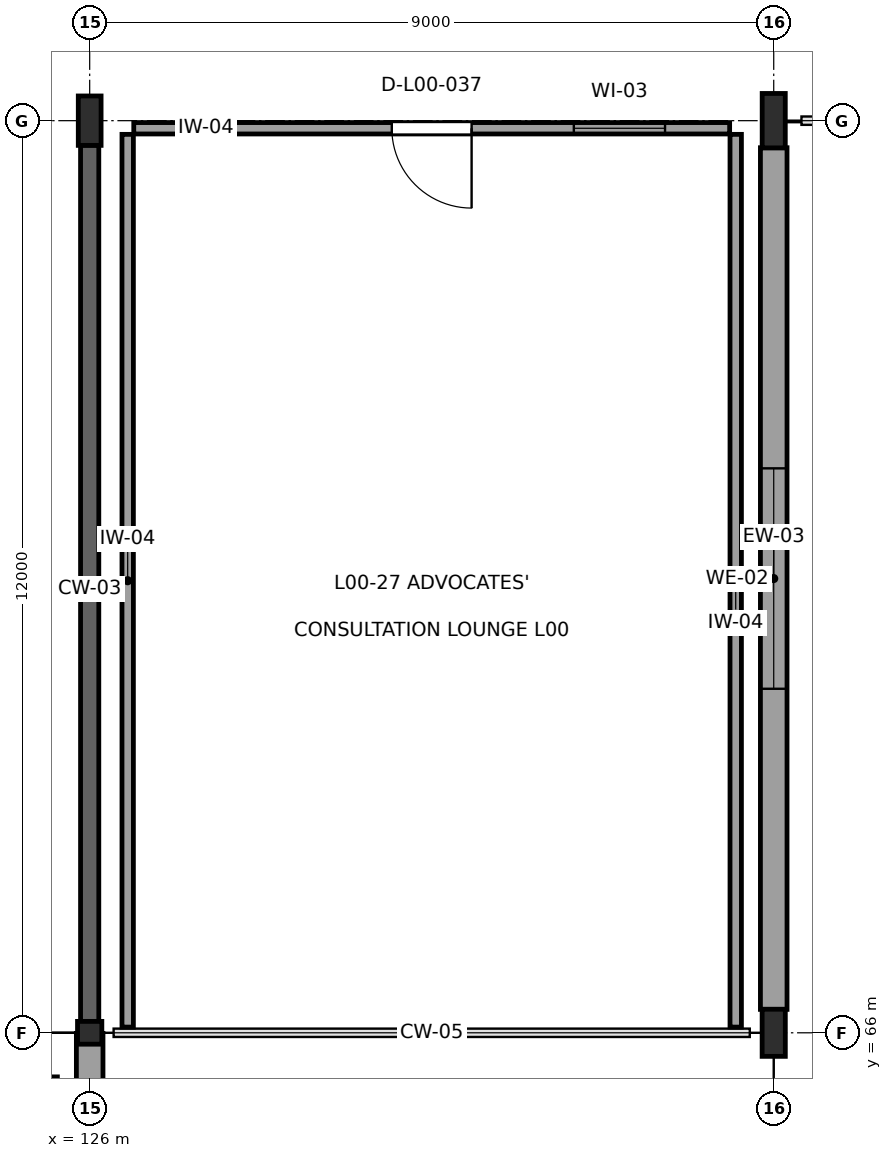
"""IFC4 building model, lengths in metres.
Left out: names, types, materials, properties, quantities, classifications, styles, units other than length and angle.
Written with IfcOpenShell. Run it as: python <this file> out.ifc"""

import sys

from ifc_helpers import new_model, si_unit, direction, frame, frame_2d, origin, origin_2d, place, context, subcontext, project, spatial, rectangle, i_section, extrude, element, fill, save


model = new_model("IFC4")
c1 = context("Model", 3, precision=1e-05, world=origin(), true_north=direction((0.0, 1.0)))
c2 = subcontext(c1, "Body", "Model", "MODEL_VIEW")
j1 = project(units=[si_unit("LENGTHUNIT", "METRE"), si_unit("PLANEANGLEUNIT", "RADIAN")], contexts=[c1])
p1 = place(None, origin())
s1 = spatial("IfcSite", under=j1, at=p1, CompositionType="ELEMENT")
p2 = place(p1, origin())
s2 = spatial("IfcBuilding", under=s1, at=p2, CompositionType="ELEMENT")
p3 = place(p2, origin())
s3 = spatial("IfcBuildingStorey", under=s2, at=p3, CompositionType="ELEMENT", Elevation=0.0)
p4 = place(p3, frame((126.0, 66.0, 0.0), z_axis=(0.0, 0.0, 1.0), x_axis=(0.0, 1.0, 0.0)))
e1 = element("IfcColumn", 1, at=p4, inside=s3, PredefinedType="COLUMN", context=c2, shape_type="SweptSolid", body=[
    extrude(i_section(OverallWidth=0.3, OverallDepth=0.32, WebThickness=0.011, FlangeThickness=0.021, at=origin_2d()), origin(), (0.0, 0.0, 1.0), 5.4),
])
p5 = place(p3, frame((126.0, 78.0, 0.0), z_axis=(0.0, 0.0, 1.0), x_axis=(1.0, 0.0, 0.0)))
e2 = element("IfcColumn", 2, at=p5, inside=s3, PredefinedType="COLUMN", context=c2, shape_type="SweptSolid", body=[
    extrude(i_section(OverallWidth=0.3, OverallDepth=0.65, WebThickness=0.016, FlangeThickness=0.031, at=origin_2d()), origin(), (0.0, 0.0, 1.0), 5.4),
])
p6 = place(p3, frame((135.0, 66.0, 0.0), z_axis=(0.0, 0.0, 1.0), x_axis=(1.0, 0.0, 0.0)))
e3 = element("IfcColumn", 3, at=p6, inside=s3, PredefinedType="COLUMN", context=c2, shape_type="SweptSolid", body=[
    extrude(i_section(OverallWidth=0.305, OverallDepth=0.62, WebThickness=0.021, FlangeThickness=0.04, at=origin_2d()), origin(), (0.0, 0.0, 1.0), 5.4),
])
p7 = place(p3, frame((135.0, 78.0, 0.0), z_axis=(0.0, 0.0, 1.0), x_axis=(1.0, 0.0, 0.0)))
e4 = element("IfcColumn", 4, at=p7, inside=s3, PredefinedType="COLUMN", context=c2, shape_type="SweptSolid", body=[
    extrude(i_section(OverallWidth=0.304, OverallDepth=0.716, WebThickness=0.021, FlangeThickness=0.04, at=origin_2d()), origin(), (0.0, 0.0, 1.0), 5.4),
])
p8 = place(p3, frame((135.0, 66.308, 0.0), z_axis=(0.0, 0.0, 1.0), x_axis=(0.0, 1.0, 0.0)))
e5 = element("IfcWall", 5, at=p8, inside=s3, PredefinedType="SOLIDWALL", context=c2, shape_type="SweptSolid", body=[
    extrude(rectangle(XDim=11.336, YDim=0.35, at=frame_2d((5.668, 0.0))), origin(), (0.0, 0.0, 1.0), 4.545),
])
p9 = place(p8, frame((4.218, 0.0, 0.65)))
e6 = element("IfcOpeningElement", 6, at=p9, cuts=e5, PredefinedType="OPENING", context=c2, shape_type="SweptSolid", body=[
    extrude(rectangle(XDim=2.9, YDim=2.9, at=frame_2d((1.45, 1.45))), frame((0.0, 0.19, 0.0), z_axis=(0.0, -1.0, 0.0), x_axis=(1.0, 0.0, 0.0)), (0.0, 0.0, 1.0), 0.38),
])
p10 = place(p3, frame((126.0, 54.158, 0.0), z_axis=(0.0, 0.0, 1.0), x_axis=(0.0, 1.0, 0.0)))
e7 = element("IfcWall", 7, at=p10, inside=s3, PredefinedType="SOLIDWALL", context=c2, shape_type="SweptSolid", body=[
    extrude(rectangle(XDim=11.834, YDim=0.35, at=frame_2d((5.917, 0.0))), origin(), (0.0, 0.0, 1.0), 4.605),
])
p11 = place(p3, frame((126.0, 66.008, 0.0), z_axis=(0.0, 0.0, 1.0), x_axis=(0.0, 1.0, 0.0)))
e8 = element("IfcWall", 8, at=p11, inside=s3, PredefinedType="SHEAR", context=c2, shape_type="SweptSolid", body=[
    extrude(rectangle(XDim=11.669, YDim=0.24, at=frame_2d((5.834, 0.0))), origin(), (0.0, 0.0, 1.0), 4.605),
])
p12 = place(p3, frame((126.5, 66.075, 0.0), z_axis=(0.0, 0.0, 1.0), x_axis=(0.0, 1.0, 0.0)))
e9 = element("IfcWall", 9, at=p12, inside=s3, PredefinedType="PARTITIONING", context=c2, shape_type="SweptSolid", body=[
    extrude(rectangle(XDim=11.745, YDim=0.15, at=frame_2d((5.873, 0.0))), origin(), (0.0, 0.0, 1.0), 5.04),
])
p13 = place(p3, frame((126.58, 77.9, 0.0), z_axis=(0.0, 0.0, 1.0), x_axis=(1.0, 0.0, 0.0)))
e10 = element("IfcWall", 10, at=p13, inside=s3, PredefinedType="PARTITIONING", context=c2, shape_type="SweptSolid", body=[
    extrude(rectangle(XDim=7.84, YDim=0.15, at=frame_2d((3.92, 0.0))), origin(), (0.0, 0.0, 1.0), 4.185),
])
p14 = place(p13, frame((3.395, 0.0, 0.0)))
e11 = element("IfcOpeningElement", 11, at=p14, cuts=e10, PredefinedType="OPENING", context=c2, shape_type="SweptSolid", body=[
    extrude(rectangle(XDim=1.05, YDim=2.25, at=frame_2d((0.525, 1.125))), frame((0.0, 0.09, 0.0), z_axis=(0.0, -1.0, 0.0), x_axis=(1.0, 0.0, 0.0)), (0.0, 0.0, 1.0), 0.18),
])
p15 = place(p13, frame((5.79, 0.0, 1.05)))
e12 = element("IfcOpeningElement", 12, at=p15, cuts=e10, PredefinedType="OPENING", context=c2, shape_type="SweptSolid", body=[
    extrude(rectangle(XDim=1.2, YDim=1.0, at=frame_2d((0.6, 0.5))), frame((0.0, 0.09, 0.0), z_axis=(0.0, -1.0, 0.0), x_axis=(1.0, 0.0, 0.0)), (0.0, 0.0, 1.0), 0.18),
])
p16 = place(p3, frame((134.5, 77.82, 0.0), z_axis=(0.0, 0.0, 1.0), x_axis=(0.0, -1.0, 0.0)))
e13 = element("IfcWall", 13, at=p16, inside=s3, PredefinedType="PARTITIONING", context=c2, shape_type="SweptSolid", body=[
    extrude(rectangle(XDim=11.745, YDim=0.15, at=frame_2d((5.873, 0.0))), origin(), (0.0, 0.0, 1.0), 5.04),
])
p17 = place(p3, frame((125.5, 65.42, 0.0), z_axis=(0.0, 0.0, 1.0), x_axis=(0.0, -1.0, 0.0)))
e14 = element("IfcWall", 14, at=p17, inside=s3, PredefinedType="PARTITIONING", context=c2, shape_type="SweptSolid", body=[
    extrude(rectangle(XDim=10.84, YDim=0.15, at=frame_2d((5.42, 0.0))), origin(), (0.0, 0.0, 1.0), 5.04),
])
p18 = place(p9, origin())
e15 = element("IfcWindow", 15, at=p18, inside=s3, PartitioningType="SINGLE_PANEL", PredefinedType="WINDOW", context=c2, shape_type="SweptSolid", body=[
    extrude(rectangle(XDim=2.9, YDim=2.9, at=frame_2d((1.45, 1.45))), frame((0.0, 0.03, 0.0), z_axis=(0.0, -1.0, 0.0), x_axis=(1.0, 0.0, 0.0)), (0.0, 0.0, 1.0), 0.06),
])
fill(e6, e15)
p19 = place(p14, frame((1.05, 0.0, 0.0), z_axis=(0.0, 0.0, 1.0), x_axis=(-1.0, 0.0, 0.0)))
e16 = element("IfcDoor", 16, at=p19, inside=s3, OperationType="SINGLE_SWING_RIGHT", PredefinedType="DOOR", context=c2, shape_type="SweptSolid", body=[
    extrude(rectangle(XDim=1.05, YDim=2.25, at=frame_2d((0.525, 1.125))), frame((0.0, 0.025, 0.0), z_axis=(0.0, -1.0, 0.0), x_axis=(1.0, 0.0, 0.0)), (0.0, 0.0, 1.0), 0.05),
])
fill(e11, e16)
p20 = place(p15, origin())
e17 = element("IfcWindow", 17, at=p20, inside=s3, PartitioningType="SINGLE_PANEL", PredefinedType="WINDOW", context=c2, shape_type="SweptSolid", body=[
    extrude(rectangle(XDim=1.2, YDim=1.0, at=frame_2d((0.6, 0.5))), frame((0.0, 0.03, 0.0), z_axis=(0.0, -1.0, 0.0), x_axis=(1.0, 0.0, 0.0)), (0.0, 0.0, 1.0), 0.06),
])
fill(e12, e17)
save(model, sys.argv[1])
